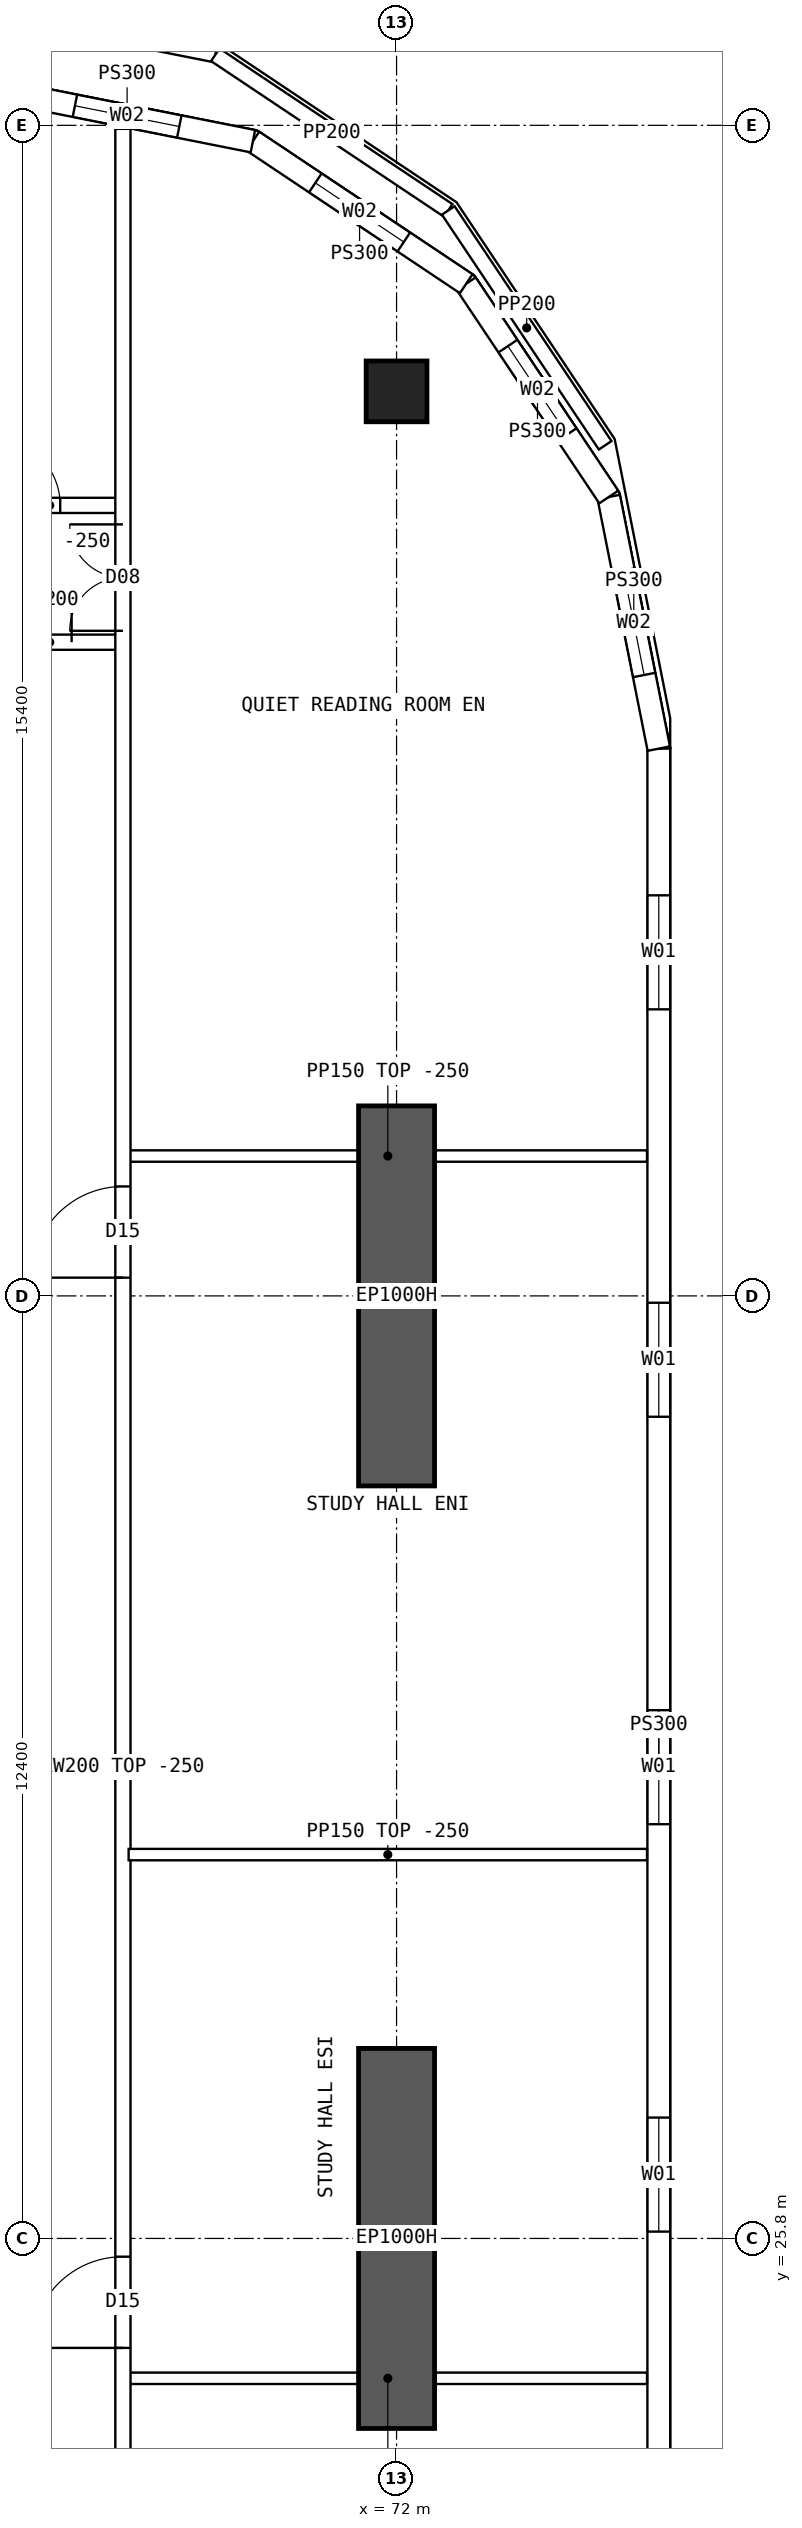
"""IFC4 building model, lengths in metres.
Left out: names, types, materials, properties, quantities, classifications, styles, units other than length and angle.
Written with IfcOpenShell. Run it as: python <this file> out.ifc"""

import sys

from ifc_helpers import new_model, si_unit, direction, frame, frame_2d, origin, origin_2d, place, context, subcontext, project, spatial, polyline, rectangle, hollow_rectangle, outline, extrude, element, fill, save


model = new_model("IFC4")
c1 = context("Model", 3, precision=1e-05, world=origin(), true_north=direction((0.0, 1.0)))
c2 = subcontext(c1, "Body", "Model", "MODEL_VIEW")
j1 = project(units=[si_unit("LENGTHUNIT", "METRE"), si_unit("PLANEANGLEUNIT", "RADIAN")], contexts=[c1])
p1 = place(None, origin())
s1 = spatial("IfcSite", under=j1, at=p1, CompositionType="ELEMENT")
p2 = place(p1, origin())
s2 = spatial("IfcBuilding", under=s1, at=p2, CompositionType="ELEMENT")
p3 = place(p2, frame((0.0, 0.0, 140.35)))
s3 = spatial("IfcBuildingStorey", under=s2, at=p3, CompositionType="ELEMENT", Elevation=140.35)
p4 = place(p3, frame((72.0, 50.1, 0.0), z_axis=(0.0, 0.0, 1.0), x_axis=(1.0, 0.0, 0.0)))
e1 = element("IfcColumn", 1, at=p4, inside=s3, PredefinedType="COLUMN", context=c2, shape_type="SweptSolid", body=[
    extrude(hollow_rectangle(XDim=0.8, YDim=0.8, WallThickness=0.08, at=origin_2d()), origin(), (0.0, 0.0, 1.0), 4.5),
])
for number, where, z_axis, x_axis in (
    (2, (72.0, 23.3, 0.0), (0.0, 0.0, 1.0), (0.0, 1.0, 0.0)),
    (3, (72.0, 35.7, 0.0), (0.0, 0.0, 1.0), (0.0, 1.0, 0.0)),
):
    element("IfcWall", number, at=place(p3, frame(where, z_axis=z_axis, x_axis=x_axis)), inside=s3, PredefinedType="SHEAR", context=c2, shape_type="SweptSolid", body=[
        extrude(rectangle(XDim=5.0, YDim=1.0, at=frame_2d((2.5, 0.0))), origin(), (0.0, 0.0, 1.0), 4.5),
    ])
p5 = place(p3, frame((75.45, 18.6, 0.0), z_axis=(0.0, 0.0, 1.0), x_axis=(0.0, 1.0, 0.0)))
e4 = element("IfcWall", 4, at=p5, inside=s3, PredefinedType="SOLIDWALL", context=c2, shape_type="SweptSolid", body=[
    extrude(outline(polyline([(-0.015, -0.15), (26.815, -0.15), (26.785, 0.15), (0.015, 0.15), (-0.015, -0.15)])), origin(), (0.0, 0.0, 1.0), 4.25),
])
p6 = place(p5, frame((1.93, 0.0, 0.9)))
e5 = element("IfcOpeningElement", 5, at=p6, cuts=e4, PredefinedType="OPENING", context=c2, shape_type="SweptSolid", body=[
    extrude(rectangle(XDim=1.5, YDim=2.0, at=frame_2d((0.75, 1.0))), frame((0.0, 0.16, 0.0), z_axis=(0.0, -1.0, 0.0), x_axis=(1.0, 0.0, 0.0)), (0.0, 0.0, 1.0), 0.32),
])
p7 = place(p5, frame((7.29, 0.0, 0.9)))
e6 = element("IfcOpeningElement", 6, at=p7, cuts=e4, PredefinedType="OPENING", context=c2, shape_type="SweptSolid", body=[
    extrude(rectangle(XDim=1.5, YDim=2.0, at=frame_2d((0.75, 1.0))), frame((0.0, 0.16, 0.0), z_axis=(0.0, -1.0, 0.0), x_axis=(1.0, 0.0, 0.0)), (0.0, 0.0, 1.0), 0.32),
])
p8 = place(p5, frame((12.65, 0.0, 0.9)))
e7 = element("IfcOpeningElement", 7, at=p8, cuts=e4, PredefinedType="OPENING", context=c2, shape_type="SweptSolid", body=[
    extrude(rectangle(XDim=1.5, YDim=2.0, at=frame_2d((0.75, 1.0))), frame((0.0, 0.16, 0.0), z_axis=(0.0, -1.0, 0.0), x_axis=(1.0, 0.0, 0.0)), (0.0, 0.0, 1.0), 0.32),
])
p9 = place(p5, frame((18.01, 0.0, 0.9)))
e8 = element("IfcOpeningElement", 8, at=p9, cuts=e4, PredefinedType="OPENING", context=c2, shape_type="SweptSolid", body=[
    extrude(rectangle(XDim=1.5, YDim=2.0, at=frame_2d((0.75, 1.0))), frame((0.0, 0.16, 0.0), z_axis=(0.0, -1.0, 0.0), x_axis=(1.0, 0.0, 0.0)), (0.0, 0.0, 1.0), 0.32),
])
p10 = place(p5, frame((23.37, 0.0, 0.9)))
e9 = element("IfcOpeningElement", 9, at=p10, cuts=e4, PredefinedType="OPENING", context=c2, shape_type="SweptSolid", body=[
    extrude(rectangle(XDim=1.5, YDim=2.0, at=frame_2d((0.75, 1.0))), frame((0.0, 0.16, 0.0), z_axis=(0.0, -1.0, 0.0), x_axis=(1.0, 0.0, 0.0)), (0.0, 0.0, 1.0), 0.32),
])
p11 = place(p3, frame((75.45, 45.4, 0.0), z_axis=(0.0, 0.0, 1.0), x_axis=(-0.19508664885, 0.980786011034, 0.0)))
e10 = element("IfcWall", 10, at=p11, inside=s3, PredefinedType="SOLIDWALL", context=c2, shape_type="SweptSolid", body=[
    extrude(outline(polyline([(-0.015, -0.15), (3.405, -0.15), (3.345, 0.15), (0.015, 0.15), (-0.015, -0.15)])), origin(), (0.0, 0.0, 1.0), 4.25),
])
p12 = place(p11, frame((0.988, 0.0, 0.9)))
e11 = element("IfcOpeningElement", 11, at=p12, cuts=e10, PredefinedType="OPENING", context=c2, shape_type="SweptSolid", body=[
    extrude(rectangle(XDim=1.4, YDim=1.8, at=frame_2d((0.7, 0.9))), frame((0.0, 0.16, 0.0), z_axis=(0.0, -1.0, 0.0), x_axis=(1.0, 0.0, 0.0)), (0.0, 0.0, 1.0), 0.32),
])
p13 = place(p3, frame((74.792, 48.71, 0.0), z_axis=(0.0, 0.0, 1.0), x_axis=(-0.555534554399, 0.831493450887, 0.0)))
e12 = element("IfcWall", 12, at=p13, inside=s3, PredefinedType="SOLIDWALL", context=c2, shape_type="SweptSolid", body=[
    extrude(outline(polyline([(-0.03, -0.15), (3.405, -0.15), (3.345, 0.15), (0.03, 0.15), (-0.03, -0.15)])), origin(), (0.0, 0.0, 1.0), 4.25),
])
p14 = place(p13, frame((0.988, 0.0, 0.9)))
e13 = element("IfcOpeningElement", 13, at=p14, cuts=e12, PredefinedType="OPENING", context=c2, shape_type="SweptSolid", body=[
    extrude(rectangle(XDim=1.4, YDim=1.8, at=frame_2d((0.7, 0.9))), frame((0.0, 0.16, 0.0), z_axis=(0.0, -1.0, 0.0), x_axis=(1.0, 0.0, 0.0)), (0.0, 0.0, 1.0), 0.32),
])
p15 = place(p3, frame((72.917, 51.517, 0.0), z_axis=(0.0, 0.0, 1.0), x_axis=(-0.831493450887, 0.555534554399, 0.0)))
e14 = element("IfcWall", 14, at=p15, inside=s3, PredefinedType="SOLIDWALL", context=c2, shape_type="SweptSolid", body=[
    extrude(outline(polyline([(-0.03, -0.15), (3.405, -0.15), (3.345, 0.15), (0.03, 0.15), (-0.03, -0.15)])), origin(), (0.0, 0.0, 1.0), 4.25),
])
p16 = place(p15, frame((0.988, 0.0, 0.9)))
e15 = element("IfcOpeningElement", 15, at=p16, cuts=e14, PredefinedType="OPENING", context=c2, shape_type="SweptSolid", body=[
    extrude(rectangle(XDim=1.4, YDim=1.8, at=frame_2d((0.7, 0.9))), frame((0.0, 0.16, 0.0), z_axis=(0.0, -1.0, 0.0), x_axis=(1.0, 0.0, 0.0)), (0.0, 0.0, 1.0), 0.32),
])
p17 = place(p3, frame((70.11, 53.392, 0.0), z_axis=(0.0, 0.0, 1.0), x_axis=(-0.98078325777, 0.195100490205, 0.0)))
e16 = element("IfcWall", 16, at=p17, inside=s3, PredefinedType="SOLIDWALL", context=c2, shape_type="SweptSolid", body=[
    extrude(outline(polyline([(-0.03, -0.15), (3.405, -0.15), (3.345, 0.15), (0.03, 0.15), (-0.03, -0.15)])), origin(), (0.0, 0.0, 1.0), 4.25),
])
p18 = place(p17, frame((0.988, 0.0, 0.9)))
e17 = element("IfcOpeningElement", 17, at=p18, cuts=e16, PredefinedType="OPENING", context=c2, shape_type="SweptSolid", body=[
    extrude(rectangle(XDim=1.4, YDim=1.8, at=frame_2d((0.7, 0.9))), frame((0.0, 0.16, 0.0), z_axis=(0.0, -1.0, 0.0), x_axis=(1.0, 0.0, 0.0)), (0.0, 0.0, 1.0), 0.32),
])
p19 = place(p3, frame((65.985, 55.25, 0.0), z_axis=(0.0, 0.0, 1.0), x_axis=(0.980780584923, -0.195113926303, 0.0)))
e18 = element("IfcWall", 18, at=p19, inside=s3, PredefinedType="PARAPET", context=c2, shape_type="SweptSolid", body=[
    extrude(rectangle(XDim=3.701, YDim=0.2, at=frame_2d((1.851, 0.0))), origin(), (0.0, 0.0, 1.0), 1.1),
])
p20 = place(p3, frame((69.615, 54.528, 0.0), z_axis=(0.0, 0.0, 1.0), x_axis=(0.831479238083, -0.555555826751, 0.0)))
e19 = element("IfcWall", 19, at=p20, inside=s3, PredefinedType="PARAPET", context=c2, shape_type="SweptSolid", body=[
    extrude(rectangle(XDim=3.686, YDim=0.2, at=frame_2d((1.843, 0.0))), origin(), (0.0, 0.0, 1.0), 1.1),
])
p21 = place(p3, frame((72.68, 52.48, 0.0), z_axis=(0.0, 0.0, 1.0), x_axis=(0.555533862817, -0.831493912945, 0.0)))
e20 = element("IfcWall", 20, at=p21, inside=s3, PredefinedType="PARAPET", context=c2, shape_type="SweptSolid", body=[
    extrude(rectangle(XDim=3.716, YDim=0.2, at=frame_2d((1.858, 0.0))), origin(), (0.0, 0.0, 1.0), 1.1),
])
p22 = place(p3, frame((66.475, 48.6, 0.0), z_axis=(0.0, 0.0, 1.0), x_axis=(1.0, 0.0, 0.0)))
e21 = element("IfcWall", 21, at=p22, inside=s3, PredefinedType="SOLIDWALL", context=c2, shape_type="SweptSolid", body=[
    extrude(rectangle(XDim=1.925, YDim=0.2, at=frame_2d((0.962, 0.0))), origin(), (0.0, 0.0, 1.0), 4.25),
])
p23 = place(p22, frame((0.2, 0.0, 0.0)))
e22 = element("IfcOpeningElement", 22, at=p23, cuts=e21, PredefinedType="OPENING", context=c2, shape_type="SweptSolid", body=[
    extrude(rectangle(XDim=0.9, YDim=2.1, at=frame_2d((0.45, 1.05))), frame((0.0, 0.11, 0.0), z_axis=(0.0, -1.0, 0.0), x_axis=(1.0, 0.0, 0.0)), (0.0, 0.0, 1.0), 0.22),
])
p24 = place(p3, frame((66.475, 46.8, 0.0), z_axis=(0.0, 0.0, 1.0), x_axis=(1.0, 0.0, 0.0)))
e23 = element("IfcWall", 23, at=p24, inside=s3, PredefinedType="SOLIDWALL", context=c2, shape_type="SweptSolid", body=[
    extrude(rectangle(XDim=1.925, YDim=0.2, at=frame_2d((0.962, 0.0))), origin(), (0.0, 0.0, 1.0), 4.25),
])
p25 = place(p24, frame((0.05, 0.0, 0.0)))
e24 = element("IfcOpeningElement", 24, at=p25, cuts=e23, PredefinedType="OPENING", context=c2, shape_type="SweptSolid", body=[
    extrude(rectangle(XDim=1.2, YDim=2.1, at=frame_2d((0.6, 1.05))), frame((0.0, 0.11, 0.0), z_axis=(0.0, -1.0, 0.0), x_axis=(1.0, 0.0, 0.0)), (0.0, 0.0, 1.0), 0.22),
])
p26 = place(p3, frame((68.475, 30.85, 0.0), z_axis=(0.0, 0.0, 1.0), x_axis=(1.0, 0.0, 0.0)))
e25 = element("IfcWall", 25, at=p26, inside=s3, PredefinedType="PARTITIONING", context=c2, shape_type="SweptSolid", body=[
    extrude(outline(polyline([(0.0, 0.0), (6.82, 0.0), (6.82, 4.25), (3.827, 4.25), (3.825, 3.8), (3.227, 3.8), (3.225, 4.25), (0.0, 4.25), (0.0, 0.0)])), frame((0.0, 0.075, 0.0), z_axis=(0.0, -1.0, 0.0), x_axis=(1.0, 0.0, 0.0)), (0.0, 0.0, 1.0), 0.15),
])
p27 = place(p3, frame((68.4, 10.446, 0.0), z_axis=(0.0, 0.0, 1.0), x_axis=(0.0, 1.0, 0.0)))
e26 = element("IfcWall", 26, at=p27, inside=s3, PredefinedType="SOLIDWALL", context=c2, shape_type="SweptSolid", body=[
    extrude(rectangle(XDim=43.107, YDim=0.2, at=frame_2d((21.554, 0.0))), origin(), (0.0, 0.0, 1.0), 4.25),
])
p28 = place(p27, frame((13.914, 0.0, 0.0)))
e27 = element("IfcOpeningElement", 27, at=p28, cuts=e26, PredefinedType="OPENING", context=c2, shape_type="SweptSolid", body=[
    extrude(rectangle(XDim=1.2, YDim=2.1, at=frame_2d((0.6, 1.05))), frame((0.0, 0.11, 0.0), z_axis=(0.0, -1.0, 0.0), x_axis=(1.0, 0.0, 0.0)), (0.0, 0.0, 1.0), 0.22),
])
p29 = place(p27, frame((27.994, 0.0, 0.0)))
e28 = element("IfcOpeningElement", 28, at=p29, cuts=e26, PredefinedType="OPENING", context=c2, shape_type="SweptSolid", body=[
    extrude(rectangle(XDim=1.2, YDim=2.1, at=frame_2d((0.6, 1.05))), frame((0.0, 0.11, 0.0), z_axis=(0.0, -1.0, 0.0), x_axis=(1.0, 0.0, 0.0)), (0.0, 0.0, 1.0), 0.22),
])
p30 = place(p27, frame((5.104, 0.0, 0.0)))
e29 = element("IfcOpeningElement", 29, at=p30, cuts=e26, PredefinedType="OPENING", context=c2, shape_type="SweptSolid", body=[
    extrude(rectangle(XDim=1.4, YDim=2.1, at=frame_2d((0.7, 1.05))), frame((0.0, 0.11, 0.0), z_axis=(0.0, -1.0, 0.0), x_axis=(1.0, 0.0, 0.0)), (0.0, 0.0, 1.0), 0.22),
])
p31 = place(p27, frame((36.504, 0.0, 0.0)))
e30 = element("IfcOpeningElement", 30, at=p31, cuts=e26, PredefinedType="OPENING", context=c2, shape_type="SweptSolid", body=[
    extrude(rectangle(XDim=1.4, YDim=2.1, at=frame_2d((0.7, 1.05))), frame((0.0, 0.11, 0.0), z_axis=(0.0, -1.0, 0.0), x_axis=(1.0, 0.0, 0.0)), (0.0, 0.0, 1.0), 0.22),
])
for number, where, z_axis, x_axis in (
    (31, (68.475, 23.96, 0.0), (0.0, 0.0, 1.0), (1.0, 0.0, 0.0)),
    (32, (68.475, 40.04, 0.0), (0.0, 0.0, 1.0), (1.0, 0.0, 0.0)),
):
    element("IfcWall", number, at=place(p3, frame(where, z_axis=z_axis, x_axis=x_axis)), inside=s3, PredefinedType="PARTITIONING", context=c2, shape_type="SweptSolid", body=[
        extrude(rectangle(XDim=6.82, YDim=0.15, at=frame_2d((3.41, 0.0))), origin(), (0.0, 0.0, 1.0), 4.25),
    ])
p32 = place(p7, origin())
e33 = element("IfcWindow", 33, at=p32, inside=s3, PartitioningType="SINGLE_PANEL", PredefinedType="WINDOW", context=c2, shape_type="SweptSolid", body=[
    extrude(rectangle(XDim=1.5, YDim=2.0, at=frame_2d((0.75, 1.0))), frame((0.0, 0.03, 0.0), z_axis=(0.0, -1.0, 0.0), x_axis=(1.0, 0.0, 0.0)), (0.0, 0.0, 1.0), 0.06),
])
fill(e6, e33)
p33 = place(p8, origin())
e34 = element("IfcWindow", 34, at=p33, inside=s3, PartitioningType="SINGLE_PANEL", PredefinedType="WINDOW", context=c2, shape_type="SweptSolid", body=[
    extrude(rectangle(XDim=1.5, YDim=2.0, at=frame_2d((0.75, 1.0))), frame((0.0, 0.03, 0.0), z_axis=(0.0, -1.0, 0.0), x_axis=(1.0, 0.0, 0.0)), (0.0, 0.0, 1.0), 0.06),
])
fill(e7, e34)
p34 = place(p9, origin())
e35 = element("IfcWindow", 35, at=p34, inside=s3, PartitioningType="SINGLE_PANEL", PredefinedType="WINDOW", context=c2, shape_type="SweptSolid", body=[
    extrude(rectangle(XDim=1.5, YDim=2.0, at=frame_2d((0.75, 1.0))), frame((0.0, 0.03, 0.0), z_axis=(0.0, -1.0, 0.0), x_axis=(1.0, 0.0, 0.0)), (0.0, 0.0, 1.0), 0.06),
])
fill(e8, e35)
p35 = place(p10, origin())
e36 = element("IfcWindow", 36, at=p35, inside=s3, PartitioningType="SINGLE_PANEL", PredefinedType="WINDOW", context=c2, shape_type="SweptSolid", body=[
    extrude(rectangle(XDim=1.5, YDim=2.0, at=frame_2d((0.75, 1.0))), frame((0.0, 0.03, 0.0), z_axis=(0.0, -1.0, 0.0), x_axis=(1.0, 0.0, 0.0)), (0.0, 0.0, 1.0), 0.06),
])
fill(e9, e36)
p36 = place(p12, origin())
e37 = element("IfcWindow", 37, at=p36, inside=s3, PartitioningType="SINGLE_PANEL", PredefinedType="WINDOW", context=c2, shape_type="SweptSolid", body=[
    extrude(rectangle(XDim=1.4, YDim=1.8, at=frame_2d((0.7, 0.9))), frame((0.0, 0.03, 0.0), z_axis=(0.0, -1.0, 0.0), x_axis=(1.0, 0.0, 0.0)), (0.0, 0.0, 1.0), 0.06),
])
fill(e11, e37)
p37 = place(p14, origin())
e38 = element("IfcWindow", 38, at=p37, inside=s3, PartitioningType="SINGLE_PANEL", PredefinedType="WINDOW", context=c2, shape_type="SweptSolid", body=[
    extrude(rectangle(XDim=1.4, YDim=1.8, at=frame_2d((0.7, 0.9))), frame((0.0, 0.03, 0.0), z_axis=(0.0, -1.0, 0.0), x_axis=(1.0, 0.0, 0.0)), (0.0, 0.0, 1.0), 0.06),
])
fill(e13, e38)
p38 = place(p16, origin())
e39 = element("IfcWindow", 39, at=p38, inside=s3, PartitioningType="SINGLE_PANEL", PredefinedType="WINDOW", context=c2, shape_type="SweptSolid", body=[
    extrude(rectangle(XDim=1.4, YDim=1.8, at=frame_2d((0.7, 0.9))), frame((0.0, 0.03, 0.0), z_axis=(0.0, -1.0, 0.0), x_axis=(1.0, 0.0, 0.0)), (0.0, 0.0, 1.0), 0.06),
])
fill(e15, e39)
p39 = place(p18, origin())
e40 = element("IfcWindow", 40, at=p39, inside=s3, PartitioningType="SINGLE_PANEL", PredefinedType="WINDOW", context=c2, shape_type="SweptSolid", body=[
    extrude(rectangle(XDim=1.4, YDim=1.8, at=frame_2d((0.7, 0.9))), frame((0.0, 0.03, 0.0), z_axis=(0.0, -1.0, 0.0), x_axis=(1.0, 0.0, 0.0)), (0.0, 0.0, 1.0), 0.06),
])
fill(e17, e40)
p40 = place(p25, origin())
e41 = element("IfcDoor", 41, at=p40, inside=s3, OperationType="DOUBLE_DOOR_SINGLE_SWING", PredefinedType="DOOR", context=c2, shape_type="SweptSolid", body=[
    extrude(rectangle(XDim=1.2, YDim=2.1, at=frame_2d((0.6, 1.05))), frame((0.0, 0.025, 0.0), z_axis=(0.0, -1.0, 0.0), x_axis=(1.0, 0.0, 0.0)), (0.0, 0.0, 1.0), 0.05),
])
fill(e24, e41)
p41 = place(p28, origin())
e42 = element("IfcDoor", 42, at=p41, inside=s3, OperationType="SINGLE_SWING_LEFT", PredefinedType="DOOR", context=c2, shape_type="SweptSolid", body=[
    extrude(rectangle(XDim=1.2, YDim=2.1, at=frame_2d((0.6, 1.05))), frame((0.0, 0.025, 0.0), z_axis=(0.0, -1.0, 0.0), x_axis=(1.0, 0.0, 0.0)), (0.0, 0.0, 1.0), 0.05),
])
fill(e27, e42)
p42 = place(p29, origin())
e43 = element("IfcDoor", 43, at=p42, inside=s3, OperationType="SINGLE_SWING_LEFT", PredefinedType="DOOR", context=c2, shape_type="SweptSolid", body=[
    extrude(rectangle(XDim=1.2, YDim=2.1, at=frame_2d((0.6, 1.05))), frame((0.0, 0.025, 0.0), z_axis=(0.0, -1.0, 0.0), x_axis=(1.0, 0.0, 0.0)), (0.0, 0.0, 1.0), 0.05),
])
fill(e28, e43)
p43 = place(p31, origin())
e44 = element("IfcDoor", 44, at=p43, inside=s3, OperationType="DOUBLE_DOOR_SINGLE_SWING", PredefinedType="DOOR", context=c2, shape_type="SweptSolid", body=[
    extrude(rectangle(XDim=1.4, YDim=2.1, at=frame_2d((0.7, 1.05))), frame((0.0, 0.025, 0.0), z_axis=(0.0, -1.0, 0.0), x_axis=(1.0, 0.0, 0.0)), (0.0, 0.0, 1.0), 0.05),
])
fill(e30, e44)
p44 = place(p23, origin())
e45 = element("IfcDoor", 45, at=p44, inside=s3, OperationType="SINGLE_SWING_LEFT", PredefinedType="DOOR", context=c2, shape_type="SweptSolid", body=[
    extrude(rectangle(XDim=0.9, YDim=2.1, at=frame_2d((0.45, 1.05))), frame((0.0, 0.025, 0.0), z_axis=(0.0, -1.0, 0.0), x_axis=(1.0, 0.0, 0.0)), (0.0, 0.0, 1.0), 0.05),
])
fill(e22, e45)
save(model, sys.argv[1])
